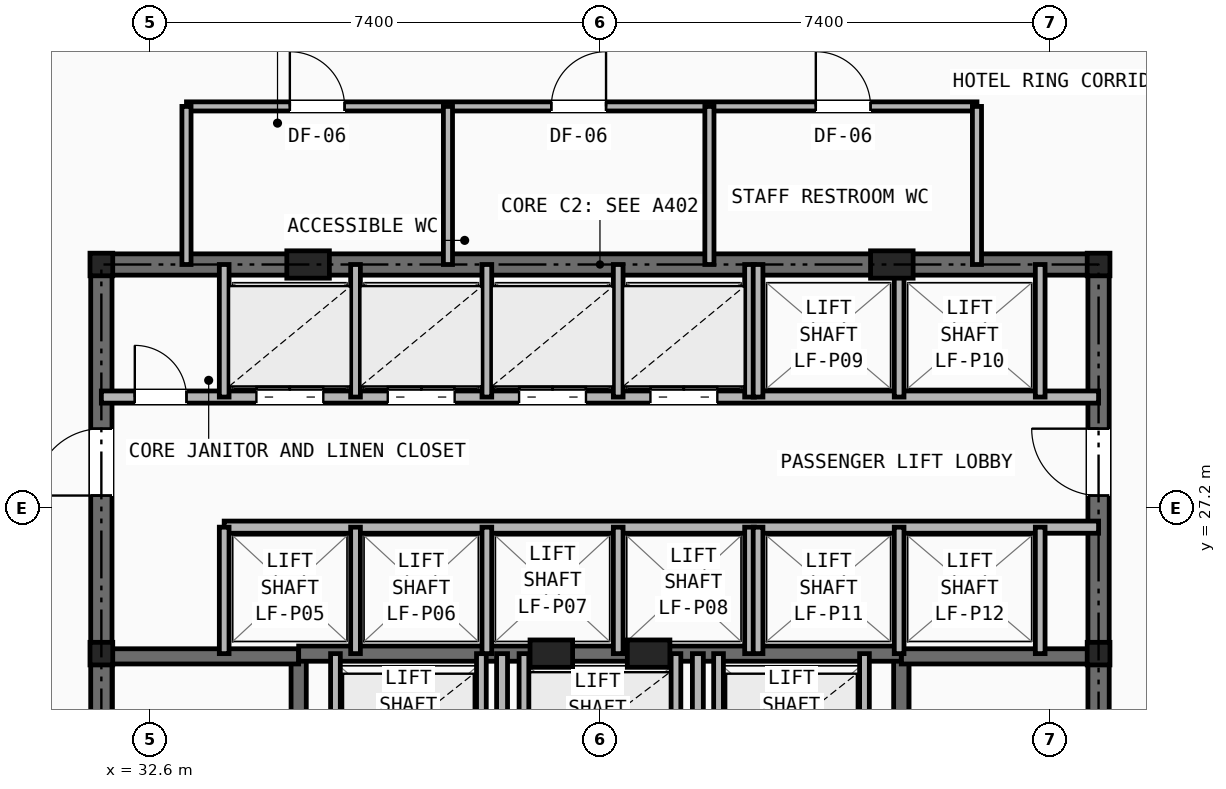
"""IFC4 building model, lengths in metres.
Left out: names, types, materials, properties, quantities, classifications, styles, units other than length and angle.
Written with IfcOpenShell. Run it as: python <this file> out.ifc"""

import sys

from ifc_helpers import new_model, si_unit, direction, frame, frame_2d, origin, origin_2d, place, context, subcontext, project, spatial, rectangle, i_section, extrude, element, fill, save


model = new_model("IFC4")
c1 = context("Model", 3, precision=1e-05, world=origin(), true_north=direction((0.0, 1.0)))
c2 = subcontext(c1, "Body", "Model", "MODEL_VIEW")
j1 = project(units=[si_unit("LENGTHUNIT", "METRE"), si_unit("PLANEANGLEUNIT", "RADIAN")], contexts=[c1])
p1 = place(None, origin())
s1 = spatial("IfcSite", under=j1, at=p1, CompositionType="ELEMENT")
p2 = place(p1, origin())
s2 = spatial("IfcBuilding", under=s1, at=p2, CompositionType="ELEMENT")
p3 = place(p2, frame((0.0, 0.0, 62.4)))
s3 = spatial("IfcBuildingStorey", under=s2, at=p3, CompositionType="ELEMENT", Elevation=62.4)
for number, where, z_axis, x_axis in (
    (1, (31.8, 24.8, 0.0), (0.0, 0.0, 1.0), (1.0, 0.0, 0.0)),
    (2, (48.2, 24.8, 0.0), (0.0, 0.0, 1.0), (1.0, 0.0, 0.0)),
    (3, (31.8, 31.2, 0.0), (0.0, 0.0, 1.0), (1.0, 0.0, 0.0)),
    (4, (48.2, 31.2, 0.0), (0.0, 0.0, 1.0), (1.0, 0.0, 0.0)),
):
    element("IfcColumn", number, at=place(p3, frame(where, z_axis=z_axis, x_axis=x_axis)), inside=s3, PredefinedType="COLUMN", context=c2, shape_type="SweptSolid", body=[
        extrude(i_section(OverallWidth=0.374, OverallDepth=0.372, WebThickness=0.016, FlangeThickness=0.026, at=origin_2d()), origin(), (0.0, 0.0, 1.0), 3.2),
    ])
for number, where, z_axis, x_axis in (
    (5, (35.2, 31.2, 0.0), (0.0, 0.0, 1.0), (1.0, 0.0, 0.0)),
    (6, (44.8, 31.2, 0.0), (0.0, 0.0, 1.0), (1.0, 0.0, 0.0)),
    (7, (39.2, 24.8, 0.0), (0.0, 0.0, 1.0), (1.0, 0.0, 0.0)),
    (8, (40.8, 24.8, 0.0), (0.0, 0.0, 1.0), (1.0, 0.0, 0.0)),
):
    element("IfcColumn", number, at=place(p3, frame(where, z_axis=z_axis, x_axis=x_axis)), inside=s3, PredefinedType="PILASTER", context=c2, shape_type="SweptSolid", body=[
        extrude(rectangle(XDim=0.7, YDim=0.45, at=origin_2d()), origin(), (0.0, 0.0, 1.0), 3.2),
    ])
p4 = place(p3, frame((31.8, 31.2, 0.0), z_axis=(0.0, 0.0, 1.0), x_axis=(1.0, 0.0, 0.0)))
e9 = element("IfcWall", 9, at=p4, inside=s3, PredefinedType="SHEAR", context=c2, shape_type="SweptSolid", body=[
    extrude(rectangle(XDim=16.4, YDim=0.35, at=frame_2d((8.2, 0.0))), origin(), (0.0, 0.0, 1.0), 2.98),
])
p5 = place(p3, frame((31.8, 16.4, 0.0), z_axis=(0.0, 0.0, 1.0), x_axis=(0.0, 1.0, 0.0)))
e10 = element("IfcWall", 10, at=p5, inside=s3, PredefinedType="SHEAR", context=c2, shape_type="SweptSolid", body=[
    extrude(rectangle(XDim=14.8, YDim=0.35, at=frame_2d((7.4, 0.0))), origin(), (0.0, 0.0, 1.0), 2.98),
])
p6 = place(p5, frame((11.0, 0.0, 0.0)))
e11 = element("IfcOpeningElement", 11, at=p6, cuts=e10, PredefinedType="OPENING", context=c2, shape_type="SweptSolid", body=[
    extrude(rectangle(XDim=1.1, YDim=2.15, at=frame_2d((0.55, 1.075))), frame((0.0, 0.185, 0.0), z_axis=(0.0, -1.0, 0.0), x_axis=(1.0, 0.0, 0.0)), (0.0, 0.0, 1.0), 0.37),
])
p7 = place(p3, frame((48.2, 16.4, 0.0), z_axis=(0.0, 0.0, 1.0), x_axis=(0.0, 1.0, 0.0)))
e12 = element("IfcWall", 12, at=p7, inside=s3, PredefinedType="SHEAR", context=c2, shape_type="SweptSolid", body=[
    extrude(rectangle(XDim=14.8, YDim=0.35, at=frame_2d((7.4, 0.0))), origin(), (0.0, 0.0, 1.0), 2.98),
])
p8 = place(p7, frame((11.0, 0.0, 0.0)))
e13 = element("IfcOpeningElement", 13, at=p8, cuts=e12, PredefinedType="OPENING", context=c2, shape_type="SweptSolid", body=[
    extrude(rectangle(XDim=1.1, YDim=2.15, at=frame_2d((0.55, 1.075))), frame((0.0, 0.185, 0.0), z_axis=(0.0, -1.0, 0.0), x_axis=(1.0, 0.0, 0.0)), (0.0, 0.0, 1.0), 0.37),
])
p9 = place(p3, frame((35.045, 16.4, 0.0), z_axis=(0.0, 0.0, 1.0), x_axis=(0.0, 1.0, 0.0)))
e14 = element("IfcWall", 14, at=p9, inside=s3, PredefinedType="SHEAR", context=c2, shape_type="SweptSolid", body=[
    extrude(rectangle(XDim=8.4, YDim=0.25, at=frame_2d((4.2, 0.0))), origin(), (0.0, 0.0, 1.0), 2.98),
])
p10 = place(p9, frame((0.45, 0.0, 0.0)))
e15 = element("IfcOpeningElement", 15, at=p10, cuts=e14, PredefinedType="OPENING", context=c2, shape_type="SweptSolid", body=[
    extrude(rectangle(XDim=0.95, YDim=2.1, at=frame_2d((0.475, 1.05))), frame((0.0, 0.135, 0.0), z_axis=(0.0, -1.0, 0.0), x_axis=(1.0, 0.0, 0.0)), (0.0, 0.0, 1.0), 0.27),
])
p11 = place(p3, frame((31.8, 24.755, 0.0), z_axis=(0.0, 0.0, 1.0), x_axis=(1.0, 0.0, 0.0)))
e16 = element("IfcWall", 16, at=p11, inside=s3, PredefinedType="SHEAR", context=c2, shape_type="SweptSolid", body=[
    extrude(rectangle(XDim=3.245, YDim=0.25, at=frame_2d((1.623, 0.0))), origin(), (0.0, 0.0, 1.0), 2.98),
])
p12 = place(p3, frame((44.955, 16.4, 0.0), z_axis=(0.0, 0.0, 1.0), x_axis=(0.0, 1.0, 0.0)))
e17 = element("IfcWall", 17, at=p12, inside=s3, PredefinedType="SHEAR", context=c2, shape_type="SweptSolid", body=[
    extrude(rectangle(XDim=8.4, YDim=0.25, at=frame_2d((4.2, 0.0))), origin(), (0.0, 0.0, 1.0), 2.98),
])
p13 = place(p12, frame((0.45, 0.0, 0.0)))
e18 = element("IfcOpeningElement", 18, at=p13, cuts=e17, PredefinedType="OPENING", context=c2, shape_type="SweptSolid", body=[
    extrude(rectangle(XDim=0.95, YDim=2.1, at=frame_2d((0.475, 1.05))), frame((0.0, 0.135, 0.0), z_axis=(0.0, -1.0, 0.0), x_axis=(1.0, 0.0, 0.0)), (0.0, 0.0, 1.0), 0.27),
])
p14 = place(p3, frame((44.955, 24.755, 0.0), z_axis=(0.0, 0.0, 1.0), x_axis=(1.0, 0.0, 0.0)))
e19 = element("IfcWall", 19, at=p14, inside=s3, PredefinedType="SHEAR", context=c2, shape_type="SweptSolid", body=[
    extrude(rectangle(XDim=3.245, YDim=0.25, at=frame_2d((1.623, 0.0))), origin(), (0.0, 0.0, 1.0), 2.98),
])
p15 = place(p3, frame((35.045, 24.8, 0.0), z_axis=(0.0, 0.0, 1.0), x_axis=(1.0, 0.0, 0.0)))
e20 = element("IfcWall", 20, at=p15, inside=s3, PredefinedType="SHEAR", context=c2, shape_type="SweptSolid", body=[
    extrude(rectangle(XDim=9.91, YDim=0.25, at=frame_2d((4.955, 0.0))), origin(), (0.0, 0.0, 1.0), 2.98),
])
p16 = place(p3, frame((38.39, 16.4, 0.0), z_axis=(0.0, 0.0, 1.0), x_axis=(0.0, 1.0, 0.0)))
e21 = element("IfcWall", 21, at=p16, inside=s3, PredefinedType="PARTITIONING", context=c2, shape_type="SweptSolid", body=[
    extrude(rectangle(XDim=8.4, YDim=0.18, at=frame_2d((4.2, 0.0))), origin(), (0.0, 0.0, 1.0), 2.431),
])
p17 = place(p16, frame((3.8, 0.0, 0.0)))
e22 = element("IfcOpeningElement", 22, at=p17, cuts=e21, PredefinedType="OPENING", context=c2, shape_type="SweptSolid", body=[
    extrude(rectangle(XDim=0.95, YDim=2.1, at=frame_2d((0.475, 1.05))), frame((0.0, 0.1, 0.0), z_axis=(0.0, -1.0, 0.0), x_axis=(1.0, 0.0, 0.0)), (0.0, 0.0, 1.0), 0.2),
])
p18 = place(p3, frame((41.61, 16.4, 0.0), z_axis=(0.0, 0.0, 1.0), x_axis=(0.0, 1.0, 0.0)))
e23 = element("IfcWall", 23, at=p18, inside=s3, PredefinedType="PARTITIONING", context=c2, shape_type="SweptSolid", body=[
    extrude(rectangle(XDim=8.4, YDim=0.18, at=frame_2d((4.2, 0.0))), origin(), (0.0, 0.0, 1.0), 2.431),
])
for number, where, z_axis, x_axis in (
    (24, (35.65, 22.48, 0.0), (0.0, 0.0, 1.0), (0.0, 1.0, 0.0)),
    (25, (38.05, 22.48, 0.0), (0.0, 0.0, 1.0), (0.0, 1.0, 0.0)),
    (26, (41.95, 22.48, 0.0), (0.0, 0.0, 1.0), (0.0, 1.0, 0.0)),
    (27, (44.35, 22.48, 0.0), (0.0, 0.0, 1.0), (0.0, 1.0, 0.0)),
    (28, (38.75, 22.48, 0.0), (0.0, 0.0, 1.0), (0.0, 1.0, 0.0)),
    (29, (41.25, 22.48, 0.0), (0.0, 0.0, 1.0), (0.0, 1.0, 0.0)),
):
    element("IfcWall", number, at=place(p3, frame(where, z_axis=z_axis, x_axis=x_axis)), inside=s3, PredefinedType="SOLIDWALL", context=c2, shape_type="SweptSolid", body=[
        extrude(rectangle(XDim=2.32, YDim=0.16, at=frame_2d((1.16, 0.0))), origin(), (0.0, 0.0, 1.0), 2.98),
    ])
p19 = place(p3, frame((31.8, 29.02, 0.0), z_axis=(0.0, 0.0, 1.0), x_axis=(1.0, 0.0, 0.0)))
e30 = element("IfcWall", 30, at=p19, inside=s3, PredefinedType="SOLIDWALL", context=c2, shape_type="SweptSolid", body=[
    extrude(rectangle(XDim=16.4, YDim=0.2, at=frame_2d((8.2, 0.0))), origin(), (0.0, 0.0, 1.0), 2.431),
])
p20 = place(p19, frame((0.55, 0.0, 0.0)))
e31 = element("IfcOpeningElement", 31, at=p20, cuts=e30, PredefinedType="OPENING", context=c2, shape_type="SweptSolid", body=[
    extrude(rectangle(XDim=0.85, YDim=2.05, at=frame_2d((0.425, 1.025))), frame((0.0, 0.11, 0.0), z_axis=(0.0, -1.0, 0.0), x_axis=(1.0, 0.0, 0.0)), (0.0, 0.0, 1.0), 0.22),
])
p21 = place(p19, frame((2.55, 0.0, 0.0)))
e32 = element("IfcOpeningElement", 32, at=p21, cuts=e30, PredefinedType="OPENING", context=c2, shape_type="SweptSolid", body=[
    extrude(rectangle(XDim=1.1, YDim=2.15, at=frame_2d((0.55, 1.075))), frame((0.0, 0.11, 0.0), z_axis=(0.0, -1.0, 0.0), x_axis=(1.0, 0.0, 0.0)), (0.0, 0.0, 1.0), 0.22),
])
p22 = place(p19, frame((4.71, 0.0, 0.0)))
e33 = element("IfcOpeningElement", 33, at=p22, cuts=e30, PredefinedType="OPENING", context=c2, shape_type="SweptSolid", body=[
    extrude(rectangle(XDim=1.1, YDim=2.15, at=frame_2d((0.55, 1.075))), frame((0.0, 0.11, 0.0), z_axis=(0.0, -1.0, 0.0), x_axis=(1.0, 0.0, 0.0)), (0.0, 0.0, 1.0), 0.22),
])
p23 = place(p19, frame((6.87, 0.0, 0.0)))
e34 = element("IfcOpeningElement", 34, at=p23, cuts=e30, PredefinedType="OPENING", context=c2, shape_type="SweptSolid", body=[
    extrude(rectangle(XDim=1.1, YDim=2.15, at=frame_2d((0.55, 1.075))), frame((0.0, 0.11, 0.0), z_axis=(0.0, -1.0, 0.0), x_axis=(1.0, 0.0, 0.0)), (0.0, 0.0, 1.0), 0.22),
])
p24 = place(p19, frame((9.03, 0.0, 0.0)))
e35 = element("IfcOpeningElement", 35, at=p24, cuts=e30, PredefinedType="OPENING", context=c2, shape_type="SweptSolid", body=[
    extrude(rectangle(XDim=1.1, YDim=2.15, at=frame_2d((0.55, 1.075))), frame((0.0, 0.11, 0.0), z_axis=(0.0, -1.0, 0.0), x_axis=(1.0, 0.0, 0.0)), (0.0, 0.0, 1.0), 0.22),
])
p25 = place(p3, frame((33.82, 26.88, 0.0), z_axis=(0.0, 0.0, 1.0), x_axis=(1.0, 0.0, 0.0)))
e36 = element("IfcWall", 36, at=p25, inside=s3, PredefinedType="SOLIDWALL", context=c2, shape_type="SweptSolid", body=[
    extrude(rectangle(XDim=14.38, YDim=0.2, at=frame_2d((7.19, 0.0))), origin(), (0.0, 0.0, 1.0), 2.431),
])
p26 = place(p3, frame((33.82, 29.02, 0.0), z_axis=(0.0, 0.0, 1.0), x_axis=(0.0, 1.0, 0.0)))
e37 = element("IfcWall", 37, at=p26, inside=s3, PredefinedType="SOLIDWALL", context=c2, shape_type="SweptSolid", body=[
    extrude(rectangle(XDim=2.18, YDim=0.16, at=frame_2d((1.09, 0.0))), origin(), (0.0, 0.0, 1.0), 2.431),
])
p27 = place(p3, frame((33.82, 24.8, 0.0), z_axis=(0.0, 0.0, 1.0), x_axis=(0.0, 1.0, 0.0)))
e38 = element("IfcWall", 38, at=p27, inside=s3, PredefinedType="SOLIDWALL", context=c2, shape_type="SweptSolid", body=[
    extrude(rectangle(XDim=2.08, YDim=0.16, at=frame_2d((1.04, 0.0))), origin(), (0.0, 0.0, 1.0), 2.98),
])
for number, where, z_axis, x_axis in (
    (39, (35.98, 29.02, 0.0), (0.0, 0.0, 1.0), (0.0, 1.0, 0.0)),
    (40, (38.14, 29.02, 0.0), (0.0, 0.0, 1.0), (0.0, 1.0, 0.0)),
    (41, (40.3, 29.02, 0.0), (0.0, 0.0, 1.0), (0.0, 1.0, 0.0)),
    (42, (42.46, 29.02, 0.0), (0.0, 0.0, 1.0), (0.0, 1.0, 0.0)),
):
    element("IfcWall", number, at=place(p3, frame(where, z_axis=z_axis, x_axis=x_axis)), inside=s3, PredefinedType="SOLIDWALL", context=c2, shape_type="SweptSolid", body=[
        extrude(rectangle(XDim=2.18, YDim=0.16, at=frame_2d((1.09, 0.0))), origin(), (0.0, 0.0, 1.0), 2.431),
    ])
for number, where, z_axis, x_axis in (
    (43, (35.98, 24.8, 0.0), (0.0, 0.0, 1.0), (0.0, 1.0, 0.0)),
    (44, (38.14, 24.8, 0.0), (0.0, 0.0, 1.0), (0.0, 1.0, 0.0)),
    (45, (40.3, 24.8, 0.0), (0.0, 0.0, 1.0), (0.0, 1.0, 0.0)),
    (46, (42.46, 24.8, 0.0), (0.0, 0.0, 1.0), (0.0, 1.0, 0.0)),
):
    element("IfcWall", number, at=place(p3, frame(where, z_axis=z_axis, x_axis=x_axis)), inside=s3, PredefinedType="SOLIDWALL", context=c2, shape_type="SweptSolid", body=[
        extrude(rectangle(XDim=2.08, YDim=0.16, at=frame_2d((1.04, 0.0))), origin(), (0.0, 0.0, 1.0), 2.98),
    ])
for number, where, z_axis, x_axis in (
    (47, (42.6, 29.02, 0.0), (0.0, 0.0, 1.0), (0.0, 1.0, 0.0)),
    (48, (44.92, 29.02, 0.0), (0.0, 0.0, 1.0), (0.0, 1.0, 0.0)),
    (49, (47.24, 29.02, 0.0), (0.0, 0.0, 1.0), (0.0, 1.0, 0.0)),
):
    element("IfcWall", number, at=place(p3, frame(where, z_axis=z_axis, x_axis=x_axis)), inside=s3, PredefinedType="SOLIDWALL", context=c2, shape_type="SweptSolid", body=[
        extrude(rectangle(XDim=2.18, YDim=0.16, at=frame_2d((1.09, 0.0))), origin(), (0.0, 0.0, 1.0), 2.431),
    ])
for number, where, z_axis, x_axis in (
    (50, (42.6, 24.8, 0.0), (0.0, 0.0, 1.0), (0.0, 1.0, 0.0)),
    (51, (44.92, 24.8, 0.0), (0.0, 0.0, 1.0), (0.0, 1.0, 0.0)),
    (52, (47.24, 24.8, 0.0), (0.0, 0.0, 1.0), (0.0, 1.0, 0.0)),
):
    element("IfcWall", number, at=place(p3, frame(where, z_axis=z_axis, x_axis=x_axis)), inside=s3, PredefinedType="SOLIDWALL", context=c2, shape_type="SweptSolid", body=[
        extrude(rectangle(XDim=2.08, YDim=0.16, at=frame_2d((1.04, 0.0))), origin(), (0.0, 0.0, 1.0), 2.98),
    ])
p28 = place(p3, frame((33.2, 33.8, 0.0), z_axis=(0.0, 0.0, 1.0), x_axis=(1.0, 0.0, 0.0)))
e53 = element("IfcWall", 53, at=p28, inside=s3, PredefinedType="PARTITIONING", context=c2, shape_type="SweptSolid", body=[
    extrude(rectangle(XDim=13.0, YDim=0.15, at=frame_2d((6.5, 0.0))), origin(), (0.0, 0.0, 1.0), 2.98),
])
p29 = place(p28, frame((1.7, 0.0, 0.0)))
e54 = element("IfcOpeningElement", 54, at=p29, cuts=e53, PredefinedType="OPENING", context=c2, shape_type="SweptSolid", body=[
    extrude(rectangle(XDim=0.9, YDim=2.1, at=frame_2d((0.45, 1.05))), frame((0.0, 0.085, 0.0), z_axis=(0.0, -1.0, 0.0), x_axis=(1.0, 0.0, 0.0)), (0.0, 0.0, 1.0), 0.17),
])
p30 = place(p28, frame((6.0, 0.0, 0.0)))
e55 = element("IfcOpeningElement", 55, at=p30, cuts=e53, PredefinedType="OPENING", context=c2, shape_type="SweptSolid", body=[
    extrude(rectangle(XDim=0.9, YDim=2.1, at=frame_2d((0.45, 1.05))), frame((0.0, 0.085, 0.0), z_axis=(0.0, -1.0, 0.0), x_axis=(1.0, 0.0, 0.0)), (0.0, 0.0, 1.0), 0.17),
])
p31 = place(p28, frame((10.35, 0.0, 0.0)))
e56 = element("IfcOpeningElement", 56, at=p31, cuts=e53, PredefinedType="OPENING", context=c2, shape_type="SweptSolid", body=[
    extrude(rectangle(XDim=0.9, YDim=2.1, at=frame_2d((0.45, 1.05))), frame((0.0, 0.085, 0.0), z_axis=(0.0, -1.0, 0.0), x_axis=(1.0, 0.0, 0.0)), (0.0, 0.0, 1.0), 0.17),
])
for number, where, z_axis, x_axis in (
    (57, (33.2, 31.2, 0.0), (0.0, 0.0, 1.0), (0.0, 1.0, 0.0)),
    (58, (46.2, 31.2, 0.0), (0.0, 0.0, 1.0), (0.0, 1.0, 0.0)),
    (59, (37.5, 31.2, 0.0), (0.0, 0.0, 1.0), (0.0, 1.0, 0.0)),
    (60, (41.8, 31.2, 0.0), (0.0, 0.0, 1.0), (0.0, 1.0, 0.0)),
):
    element("IfcWall", number, at=place(p3, frame(where, z_axis=z_axis, x_axis=x_axis)), inside=s3, PredefinedType="PARTITIONING", context=c2, shape_type="SweptSolid", body=[
        extrude(rectangle(XDim=2.6, YDim=0.15, at=frame_2d((1.3, 0.0))), origin(), (0.0, 0.0, 1.0), 2.431),
    ])
p32 = place(p20, origin())
e61 = element("IfcDoor", 61, at=p32, inside=s3, OperationType="SINGLE_SWING_LEFT", PredefinedType="DOOR", context=c2, shape_type="SweptSolid", body=[
    extrude(rectangle(XDim=0.85, YDim=2.05, at=frame_2d((0.425, 1.025))), frame((0.0, 0.025, 0.0), z_axis=(0.0, -1.0, 0.0), x_axis=(1.0, 0.0, 0.0)), (0.0, 0.0, 1.0), 0.05),
])
fill(e31, e61)
p33 = place(p6, origin())
e62 = element("IfcDoor", 62, at=p33, inside=s3, OperationType="SINGLE_SWING_LEFT", PredefinedType="DOOR", context=c2, shape_type="SweptSolid", body=[
    extrude(rectangle(XDim=1.1, YDim=2.15, at=frame_2d((0.55, 1.075))), frame((0.0, 0.025, 0.0), z_axis=(0.0, -1.0, 0.0), x_axis=(1.0, 0.0, 0.0)), (0.0, 0.0, 1.0), 0.05),
])
fill(e11, e62)
p34 = place(p8, origin())
e63 = element("IfcDoor", 63, at=p34, inside=s3, OperationType="SINGLE_SWING_RIGHT", PredefinedType="DOOR", context=c2, shape_type="SweptSolid", body=[
    extrude(rectangle(XDim=1.1, YDim=2.15, at=frame_2d((0.55, 1.075))), frame((0.0, 0.025, 0.0), z_axis=(0.0, -1.0, 0.0), x_axis=(1.0, 0.0, 0.0)), (0.0, 0.0, 1.0), 0.05),
])
fill(e13, e63)
p35 = place(p21, origin())
e64 = element("IfcDoor", 64, at=p35, inside=s3, OperationType="DOUBLE_DOOR_SLIDING", PredefinedType="DOOR", context=c2, shape_type="SweptSolid", body=[
    extrude(rectangle(XDim=1.1, YDim=2.15, at=frame_2d((0.55, 1.075))), frame((0.0, 0.025, 0.0), z_axis=(0.0, -1.0, 0.0), x_axis=(1.0, 0.0, 0.0)), (0.0, 0.0, 1.0), 0.05),
])
fill(e32, e64)
p36 = place(p22, origin())
e65 = element("IfcDoor", 65, at=p36, inside=s3, OperationType="DOUBLE_DOOR_SLIDING", PredefinedType="DOOR", context=c2, shape_type="SweptSolid", body=[
    extrude(rectangle(XDim=1.1, YDim=2.15, at=frame_2d((0.55, 1.075))), frame((0.0, 0.025, 0.0), z_axis=(0.0, -1.0, 0.0), x_axis=(1.0, 0.0, 0.0)), (0.0, 0.0, 1.0), 0.05),
])
fill(e33, e65)
p37 = place(p23, origin())
e66 = element("IfcDoor", 66, at=p37, inside=s3, OperationType="DOUBLE_DOOR_SLIDING", PredefinedType="DOOR", context=c2, shape_type="SweptSolid", body=[
    extrude(rectangle(XDim=1.1, YDim=2.15, at=frame_2d((0.55, 1.075))), frame((0.0, 0.025, 0.0), z_axis=(0.0, -1.0, 0.0), x_axis=(1.0, 0.0, 0.0)), (0.0, 0.0, 1.0), 0.05),
])
fill(e34, e66)
p38 = place(p24, origin())
e67 = element("IfcDoor", 67, at=p38, inside=s3, OperationType="DOUBLE_DOOR_SLIDING", PredefinedType="DOOR", context=c2, shape_type="SweptSolid", body=[
    extrude(rectangle(XDim=1.1, YDim=2.15, at=frame_2d((0.55, 1.075))), frame((0.0, 0.025, 0.0), z_axis=(0.0, -1.0, 0.0), x_axis=(1.0, 0.0, 0.0)), (0.0, 0.0, 1.0), 0.05),
])
fill(e35, e67)
p39 = place(p29, origin())
e68 = element("IfcDoor", 68, at=p39, inside=s3, OperationType="SINGLE_SWING_LEFT", PredefinedType="DOOR", context=c2, shape_type="SweptSolid", body=[
    extrude(rectangle(XDim=0.9, YDim=2.1, at=frame_2d((0.45, 1.05))), frame((0.0, 0.025, 0.0), z_axis=(0.0, -1.0, 0.0), x_axis=(1.0, 0.0, 0.0)), (0.0, 0.0, 1.0), 0.05),
])
fill(e54, e68)
p40 = place(p30, origin())
e69 = element("IfcDoor", 69, at=p40, inside=s3, OperationType="SINGLE_SWING_RIGHT", PredefinedType="DOOR", context=c2, shape_type="SweptSolid", body=[
    extrude(rectangle(XDim=0.9, YDim=2.1, at=frame_2d((0.45, 1.05))), frame((0.0, 0.025, 0.0), z_axis=(0.0, -1.0, 0.0), x_axis=(1.0, 0.0, 0.0)), (0.0, 0.0, 1.0), 0.05),
])
fill(e55, e69)
p41 = place(p31, origin())
e70 = element("IfcDoor", 70, at=p41, inside=s3, OperationType="SINGLE_SWING_LEFT", PredefinedType="DOOR", context=c2, shape_type="SweptSolid", body=[
    extrude(rectangle(XDim=0.9, YDim=2.1, at=frame_2d((0.45, 1.05))), frame((0.0, 0.025, 0.0), z_axis=(0.0, -1.0, 0.0), x_axis=(1.0, 0.0, 0.0)), (0.0, 0.0, 1.0), 0.05),
])
fill(e56, e70)
save(model, sys.argv[1])
